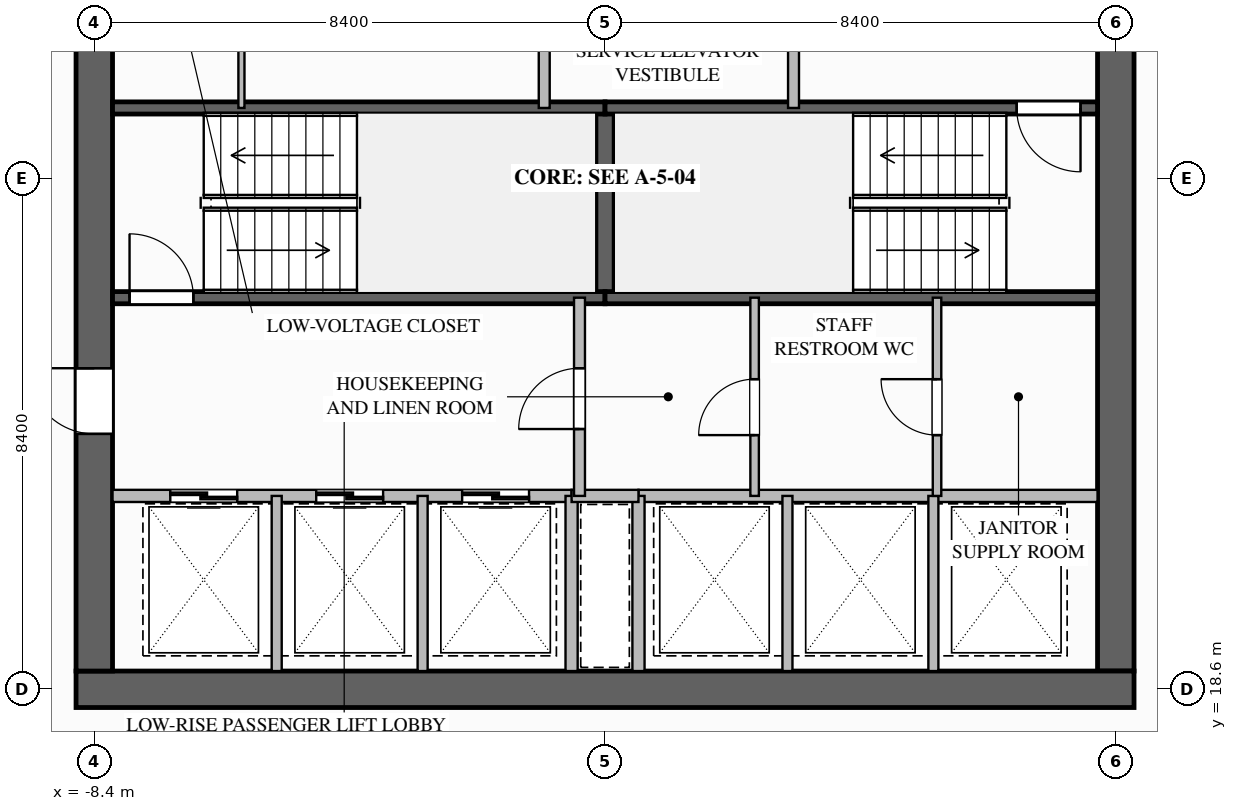
"""IFC4 building model, lengths in metres.
Left out: names, types, materials, properties, quantities, classifications, styles, units other than length and angle.
Written with IfcOpenShell. Run it as: python <this file> out.ifc"""

import sys

from ifc_helpers import new_model, si_unit, direction, frame, frame_2d, origin, place, context, subcontext, project, spatial, rectangle, extrude, element, fill, save


model = new_model("IFC4")
c1 = context("Model", 3, precision=1e-05, world=origin(), true_north=direction((0.0, 1.0)))
c2 = subcontext(c1, "Body", "Model", "MODEL_VIEW")
j1 = project(units=[si_unit("LENGTHUNIT", "METRE"), si_unit("PLANEANGLEUNIT", "RADIAN")], contexts=[c1])
p1 = place(None, origin())
s1 = spatial("IfcSite", under=j1, at=p1, CompositionType="ELEMENT")
p2 = place(p1, origin())
s2 = spatial("IfcBuilding", under=s1, at=p2, CompositionType="ELEMENT")
p3 = place(p2, frame((0.0, 0.0, 33.2)))
s3 = spatial("IfcBuildingStorey", under=s2, at=p3, CompositionType="ELEMENT", Elevation=33.2)
p4 = place(p3, frame((8.4, 35.1, 0.0), z_axis=(0.0, 0.0, 1.0), x_axis=(0.0, -1.0, 0.0)))
e1 = element("IfcWall", 1, at=p4, inside=s3, PredefinedType="SHEAR", context=c2, shape_type="SweptSolid", body=[
    extrude(rectangle(XDim=16.2, YDim=0.6, at=frame_2d((8.1, 0.0))), origin(), (0.0, 0.0, 1.0), 3.5),
])
p5 = place(p4, frame((3.08, 0.0, 0.0)))
e2 = element("IfcOpeningElement", 2, at=p5, cuts=e1, PredefinedType="OPENING", context=c2, shape_type="SweptSolid", body=[
    extrude(rectangle(XDim=1.12, YDim=2.1, at=frame_2d((0.56, 1.05))), frame((0.0, 0.31, 0.0), z_axis=(0.0, -1.0, 0.0), x_axis=(1.0, 0.0, 0.0)), (0.0, 0.0, 1.0), 0.62),
])
p6 = place(p3, frame((8.7, 18.6, 0.0), z_axis=(0.0, 0.0, 1.0), x_axis=(-1.0, 0.0, 0.0)))
e3 = element("IfcWall", 3, at=p6, inside=s3, PredefinedType="SHEAR", context=c2, shape_type="SweptSolid", body=[
    extrude(rectangle(XDim=17.4, YDim=0.6, at=frame_2d((8.7, 0.0))), origin(), (0.0, 0.0, 1.0), 3.5),
])
p7 = place(p3, frame((-8.4, 18.9, 0.0), z_axis=(0.0, 0.0, 1.0), x_axis=(0.0, 1.0, 0.0)))
e4 = element("IfcWall", 4, at=p7, inside=s3, PredefinedType="SHEAR", context=c2, shape_type="SweptSolid", body=[
    extrude(rectangle(XDim=16.2, YDim=0.6, at=frame_2d((8.1, 0.0))), origin(), (0.0, 0.0, 1.0), 3.5),
])
p8 = place(p7, frame((3.9, 0.0, 0.0)))
e5 = element("IfcOpeningElement", 5, at=p8, cuts=e4, PredefinedType="OPENING", context=c2, shape_type="SweptSolid", body=[
    extrude(rectangle(XDim=1.08, YDim=2.04, at=frame_2d((0.54, 1.02))), frame((0.0, 0.31, 0.0), z_axis=(0.0, -1.0, 0.0), x_axis=(1.0, 0.0, 0.0)), (0.0, 0.0, 1.0), 0.62),
])
p9 = place(p3, frame((0.0, 25.04, 0.0), z_axis=(0.0, 0.0, 1.0), x_axis=(0.0, 1.0, 0.0)))
e6 = element("IfcWall", 6, at=p9, inside=s3, PredefinedType="SOLIDWALL", context=c2, shape_type="SweptSolid", body=[
    extrude(rectangle(XDim=3.12, YDim=0.3, at=frame_2d((1.56, 0.0))), origin(), (0.0, 0.0, 1.0), 3.24),
])
p10 = place(p3, frame((-8.1, 25.04, 0.0), z_axis=(0.0, 0.0, 1.0), x_axis=(1.0, 0.0, 0.0)))
e7 = element("IfcWall", 7, at=p10, inside=s3, PredefinedType="SOLIDWALL", context=c2, shape_type="SweptSolid", body=[
    extrude(rectangle(XDim=8.1, YDim=0.2, at=frame_2d((4.05, 0.0))), origin(), (0.0, 0.0, 1.0), 3.24),
])
p11 = place(p10, frame((0.28, 0.0, 0.0)))
e8 = element("IfcOpeningElement", 8, at=p11, cuts=e7, PredefinedType="OPENING", context=c2, shape_type="SweptSolid", body=[
    extrude(rectangle(XDim=1.05, YDim=2.1, at=frame_2d((0.525, 1.05))), frame((0.0, 0.11, 0.0), z_axis=(0.0, -1.0, 0.0), x_axis=(1.0, 0.0, 0.0)), (0.0, 0.0, 1.0), 0.22),
])
for number, where, z_axis, x_axis in (
    (9, (-8.1, 28.16, 0.0), (0.0, 0.0, 1.0), (1.0, 0.0, 0.0)),
    (10, (0.0, 25.04, 0.0), (0.0, 0.0, 1.0), (1.0, 0.0, 0.0)),
):
    element("IfcWall", number, at=place(p3, frame(where, z_axis=z_axis, x_axis=x_axis)), inside=s3, PredefinedType="SOLIDWALL", context=c2, shape_type="SweptSolid", body=[
        extrude(rectangle(XDim=8.1, YDim=0.2, at=frame_2d((4.05, 0.0))), origin(), (0.0, 0.0, 1.0), 3.24),
    ])
p12 = place(p3, frame((8.1, 28.16, 0.0), z_axis=(0.0, 0.0, 1.0), x_axis=(-1.0, 0.0, 0.0)))
e11 = element("IfcWall", 11, at=p12, inside=s3, PredefinedType="SOLIDWALL", context=c2, shape_type="SweptSolid", body=[
    extrude(rectangle(XDim=8.1, YDim=0.2, at=frame_2d((4.05, 0.0))), origin(), (0.0, 0.0, 1.0), 3.24),
])
p13 = place(p12, frame((0.28, 0.0, 0.0)))
e12 = element("IfcOpeningElement", 12, at=p13, cuts=e11, PredefinedType="OPENING", context=c2, shape_type="SweptSolid", body=[
    extrude(rectangle(XDim=1.05, YDim=2.1, at=frame_2d((0.525, 1.05))), frame((0.0, 0.11, 0.0), z_axis=(0.0, -1.0, 0.0), x_axis=(1.0, 0.0, 0.0)), (0.0, 0.0, 1.0), 0.22),
])
p14 = place(p3, frame((3.1, 28.16, 0.0), z_axis=(0.0, 0.0, 1.0), x_axis=(0.0, 1.0, 0.0)))
e13 = element("IfcWall", 13, at=p14, inside=s3, PredefinedType="SOLIDWALL", context=c2, shape_type="SweptSolid", body=[
    extrude(rectangle(XDim=4.06, YDim=0.18, at=frame_2d((2.03, 0.0))), origin(), (0.0, 0.0, 1.0), 3.24),
])
p15 = place(p14, frame((1.4, 0.0, 0.0)))
e14 = element("IfcOpeningElement", 14, at=p15, cuts=e13, PredefinedType="OPENING", context=c2, shape_type="SweptSolid", body=[
    extrude(rectangle(XDim=1.12, YDim=2.1, at=frame_2d((0.56, 1.05))), frame((0.0, 0.1, 0.0), z_axis=(0.0, -1.0, 0.0), x_axis=(1.0, 0.0, 0.0)), (0.0, 0.0, 1.0), 0.2),
])
p16 = place(p3, frame((-1.0, 28.16, 0.0), z_axis=(0.0, 0.0, 1.0), x_axis=(0.0, 1.0, 0.0)))
e15 = element("IfcWall", 15, at=p16, inside=s3, PredefinedType="SOLIDWALL", context=c2, shape_type="SweptSolid", body=[
    extrude(rectangle(XDim=4.02, YDim=0.18, at=frame_2d((2.01, 0.0))), origin(), (0.0, 0.0, 1.0), 3.24),
])
p17 = place(p16, frame((1.4, 0.0, 0.0)))
e16 = element("IfcOpeningElement", 16, at=p17, cuts=e15, PredefinedType="OPENING", context=c2, shape_type="SweptSolid", body=[
    extrude(rectangle(XDim=1.0, YDim=2.1, at=frame_2d((0.5, 1.05))), frame((0.0, 0.1, 0.0), z_axis=(0.0, -1.0, 0.0), x_axis=(1.0, 0.0, 0.0)), (0.0, 0.0, 1.0), 0.2),
])
p18 = place(p3, frame((-5.98, 28.16, 0.0), z_axis=(0.0, 0.0, 1.0), x_axis=(0.0, 1.0, 0.0)))
e17 = element("IfcWall", 17, at=p18, inside=s3, PredefinedType="PARTITIONING", context=c2, shape_type="SweptSolid", body=[
    extrude(rectangle(XDim=4.06, YDim=0.1, at=frame_2d((2.03, 0.0))), origin(), (0.0, 0.0, 1.0), 3.24),
])
p19 = place(p18, frame((1.2, 0.0, 0.0)))
e18 = element("IfcOpeningElement", 18, at=p19, cuts=e17, PredefinedType="OPENING", context=c2, shape_type="SweptSolid", body=[
    extrude(rectangle(XDim=0.92, YDim=2.1, at=frame_2d((0.46, 1.05))), frame((0.0, 0.06, 0.0), z_axis=(0.0, -1.0, 0.0), x_axis=(1.0, 0.0, 0.0)), (0.0, 0.0, 1.0), 0.12),
])
p20 = place(p3, frame((-0.55, 21.78, 0.0), z_axis=(0.0, 0.0, 1.0), x_axis=(-1.0, 0.0, 0.0)))
e19 = element("IfcWall", 19, at=p20, inside=s3, PredefinedType="SOLIDWALL", context=c2, shape_type="SweptSolid", body=[
    extrude(rectangle(XDim=7.55, YDim=0.2, at=frame_2d((3.775, 0.0))), origin(), (0.0, 0.0, 1.0), 3.24),
])
p21 = place(p20, frame((5.5, 0.0, 0.0)))
e20 = element("IfcOpeningElement", 20, at=p21, cuts=e19, PredefinedType="OPENING", context=c2, shape_type="SweptSolid", body=[
    extrude(rectangle(XDim=1.1, YDim=2.2, at=frame_2d((0.55, 1.1))), frame((0.0, 0.11, 0.0), z_axis=(0.0, -1.0, 0.0), x_axis=(1.0, 0.0, 0.0)), (0.0, 0.0, 1.0), 0.22),
])
p22 = place(p20, frame((3.1, 0.0, 0.0)))
e21 = element("IfcOpeningElement", 21, at=p22, cuts=e19, PredefinedType="OPENING", context=c2, shape_type="SweptSolid", body=[
    extrude(rectangle(XDim=1.1, YDim=2.2, at=frame_2d((0.55, 1.1))), frame((0.0, 0.11, 0.0), z_axis=(0.0, -1.0, 0.0), x_axis=(1.0, 0.0, 0.0)), (0.0, 0.0, 1.0), 0.22),
])
p23 = place(p20, frame((0.7, 0.0, 0.0)))
e22 = element("IfcOpeningElement", 22, at=p23, cuts=e19, PredefinedType="OPENING", context=c2, shape_type="SweptSolid", body=[
    extrude(rectangle(XDim=1.1, YDim=2.2, at=frame_2d((0.55, 1.1))), frame((0.0, 0.11, 0.0), z_axis=(0.0, -1.0, 0.0), x_axis=(1.0, 0.0, 0.0)), (0.0, 0.0, 1.0), 0.22),
])
for number, where, z_axis, x_axis in (
    (23, (-5.4, 18.9, 0.0), (0.0, 0.0, 1.0), (0.0, 1.0, 0.0)),
    (24, (-3.0, 18.9, 0.0), (0.0, 0.0, 1.0), (0.0, 1.0, 0.0)),
):
    element("IfcWall", number, at=place(p3, frame(where, z_axis=z_axis, x_axis=x_axis)), inside=s3, PredefinedType="PARTITIONING", context=c2, shape_type="SweptSolid", body=[
        extrude(rectangle(XDim=2.88, YDim=0.165, at=frame_2d((1.44, 0.0))), origin(), (0.0, 0.0, 1.0), 3.24),
    ])
p24 = place(p3, frame((-0.55, 18.9, 0.0), z_axis=(0.0, 0.0, 1.0), x_axis=(0.0, 1.0, 0.0)))
e25 = element("IfcWall", 25, at=p24, inside=s3, PredefinedType="SOLIDWALL", context=c2, shape_type="SweptSolid", body=[
    extrude(rectangle(XDim=2.88, YDim=0.2, at=frame_2d((1.44, 0.0))), origin(), (0.0, 0.0, 1.0), 3.24),
])
p25 = place(p3, frame((8.1, 21.78, 0.0), z_axis=(0.0, 0.0, 1.0), x_axis=(-1.0, 0.0, 0.0)))
e26 = element("IfcWall", 26, at=p25, inside=s3, PredefinedType="SOLIDWALL", context=c2, shape_type="SweptSolid", body=[
    extrude(rectangle(XDim=7.55, YDim=0.2, at=frame_2d((3.775, 0.0))), origin(), (0.0, 0.0, 1.0), 3.24),
])
p26 = place(p3, frame((0.55, 18.9, 0.0), z_axis=(0.0, 0.0, 1.0), x_axis=(0.0, 1.0, 0.0)))
e27 = element("IfcWall", 27, at=p26, inside=s3, PredefinedType="SOLIDWALL", context=c2, shape_type="SweptSolid", body=[
    extrude(rectangle(XDim=2.88, YDim=0.2, at=frame_2d((1.44, 0.0))), origin(), (0.0, 0.0, 1.0), 3.24),
])
for number, where, z_axis, x_axis in (
    (28, (3.0, 18.9, 0.0), (0.0, 0.0, 1.0), (0.0, 1.0, 0.0)),
    (29, (5.4, 18.9, 0.0), (0.0, 0.0, 1.0), (0.0, 1.0, 0.0)),
):
    element("IfcWall", number, at=place(p3, frame(where, z_axis=z_axis, x_axis=x_axis)), inside=s3, PredefinedType="PARTITIONING", context=c2, shape_type="SweptSolid", body=[
        extrude(rectangle(XDim=2.88, YDim=0.165, at=frame_2d((1.44, 0.0))), origin(), (0.0, 0.0, 1.0), 3.24),
    ])
p27 = place(p3, frame((-0.55, 21.78, 0.0), z_axis=(0.0, 0.0, 1.0), x_axis=(1.0, 0.0, 0.0)))
e30 = element("IfcWall", 30, at=p27, inside=s3, PredefinedType="SOLIDWALL", context=c2, shape_type="SweptSolid", body=[
    extrude(rectangle(XDim=1.1, YDim=0.2, at=frame_2d((0.55, 0.0))), origin(), (0.0, 0.0, 1.0), 3.24),
])
p28 = place(p3, frame((-0.42, 21.78, 0.0), z_axis=(0.0, 0.0, 1.0), x_axis=(0.0, 1.0, 0.0)))
e31 = element("IfcWall", 31, at=p28, inside=s3, PredefinedType="SOLIDWALL", context=c2, shape_type="SweptSolid", body=[
    extrude(rectangle(XDim=3.26, YDim=0.18, at=frame_2d((1.63, 0.0))), origin(), (0.0, 0.0, 1.0), 3.24),
])
p29 = place(p28, frame((1.1, 0.0, 0.0)))
e32 = element("IfcOpeningElement", 32, at=p29, cuts=e31, PredefinedType="OPENING", context=c2, shape_type="SweptSolid", body=[
    extrude(rectangle(XDim=1.0, YDim=2.1, at=frame_2d((0.5, 1.05))), frame((0.0, 0.1, 0.0), z_axis=(0.0, -1.0, 0.0), x_axis=(1.0, 0.0, 0.0)), (0.0, 0.0, 1.0), 0.2),
])
p30 = place(p3, frame((2.46, 21.78, 0.0), z_axis=(0.0, 0.0, 1.0), x_axis=(0.0, 1.0, 0.0)))
e33 = element("IfcWall", 33, at=p30, inside=s3, PredefinedType="PLUMBINGWALL", context=c2, shape_type="SweptSolid", body=[
    extrude(rectangle(XDim=3.26, YDim=0.14, at=frame_2d((1.63, 0.0))), origin(), (0.0, 0.0, 1.0), 3.24),
])
p31 = place(p30, frame((1.0, 0.0, 0.0)))
e34 = element("IfcOpeningElement", 34, at=p31, cuts=e33, PredefinedType="OPENING", context=c2, shape_type="SweptSolid", body=[
    extrude(rectangle(XDim=0.92, YDim=2.1, at=frame_2d((0.46, 1.05))), frame((0.0, 0.08, 0.0), z_axis=(0.0, -1.0, 0.0), x_axis=(1.0, 0.0, 0.0)), (0.0, 0.0, 1.0), 0.16),
])
p32 = place(p3, frame((5.46, 21.78, 0.0), z_axis=(0.0, 0.0, 1.0), x_axis=(0.0, 1.0, 0.0)))
e35 = element("IfcWall", 35, at=p32, inside=s3, PredefinedType="PLUMBINGWALL", context=c2, shape_type="SweptSolid", body=[
    extrude(rectangle(XDim=3.26, YDim=0.14, at=frame_2d((1.63, 0.0))), origin(), (0.0, 0.0, 1.0), 3.24),
])
p33 = place(p32, frame((1.0, 0.0, 0.0)))
e36 = element("IfcOpeningElement", 36, at=p33, cuts=e35, PredefinedType="OPENING", context=c2, shape_type="SweptSolid", body=[
    extrude(rectangle(XDim=0.92, YDim=2.1, at=frame_2d((0.46, 1.05))), frame((0.0, 0.08, 0.0), z_axis=(0.0, -1.0, 0.0), x_axis=(1.0, 0.0, 0.0)), (0.0, 0.0, 1.0), 0.16),
])
p34 = place(p11, origin())
e37 = element("IfcDoor", 37, at=p34, inside=s3, OperationType="SINGLE_SWING_LEFT", PredefinedType="DOOR", context=c2, shape_type="SweptSolid", body=[
    extrude(rectangle(XDim=1.05, YDim=2.1, at=frame_2d((0.525, 1.05))), frame((0.0, 0.025, 0.0), z_axis=(0.0, -1.0, 0.0), x_axis=(1.0, 0.0, 0.0)), (0.0, 0.0, 1.0), 0.05),
])
fill(e8, e37)
p35 = place(p13, origin())
e38 = element("IfcDoor", 38, at=p35, inside=s3, OperationType="SINGLE_SWING_LEFT", PredefinedType="DOOR", context=c2, shape_type="SweptSolid", body=[
    extrude(rectangle(XDim=1.05, YDim=2.1, at=frame_2d((0.525, 1.05))), frame((0.0, 0.025, 0.0), z_axis=(0.0, -1.0, 0.0), x_axis=(1.0, 0.0, 0.0)), (0.0, 0.0, 1.0), 0.05),
])
fill(e12, e38)
p36 = place(p21, origin())
e39 = element("IfcDoor", 39, at=p36, inside=s3, OperationType="SLIDING_TO_LEFT", PredefinedType="DOOR", context=c2, shape_type="SweptSolid", body=[
    extrude(rectangle(XDim=1.1, YDim=2.2, at=frame_2d((0.55, 1.1))), frame((0.0, 0.025, 0.0), z_axis=(0.0, -1.0, 0.0), x_axis=(1.0, 0.0, 0.0)), (0.0, 0.0, 1.0), 0.05),
])
fill(e20, e39)
p37 = place(p22, origin())
e40 = element("IfcDoor", 40, at=p37, inside=s3, OperationType="SLIDING_TO_LEFT", PredefinedType="DOOR", context=c2, shape_type="SweptSolid", body=[
    extrude(rectangle(XDim=1.1, YDim=2.2, at=frame_2d((0.55, 1.1))), frame((0.0, 0.025, 0.0), z_axis=(0.0, -1.0, 0.0), x_axis=(1.0, 0.0, 0.0)), (0.0, 0.0, 1.0), 0.05),
])
fill(e21, e40)
p38 = place(p23, origin())
e41 = element("IfcDoor", 41, at=p38, inside=s3, OperationType="SLIDING_TO_LEFT", PredefinedType="DOOR", context=c2, shape_type="SweptSolid", body=[
    extrude(rectangle(XDim=1.1, YDim=2.2, at=frame_2d((0.55, 1.1))), frame((0.0, 0.025, 0.0), z_axis=(0.0, -1.0, 0.0), x_axis=(1.0, 0.0, 0.0)), (0.0, 0.0, 1.0), 0.05),
])
fill(e22, e41)
p39 = place(p29, origin())
e42 = element("IfcDoor", 42, at=p39, inside=s3, OperationType="SINGLE_SWING_LEFT", PredefinedType="DOOR", context=c2, shape_type="SweptSolid", body=[
    extrude(rectangle(XDim=1.0, YDim=2.1, at=frame_2d((0.5, 1.05))), frame((0.0, 0.025, 0.0), z_axis=(0.0, -1.0, 0.0), x_axis=(1.0, 0.0, 0.0)), (0.0, 0.0, 1.0), 0.05),
])
fill(e32, e42)
p40 = place(p8, origin())
e43 = element("IfcDoor", 43, at=p40, inside=s3, OperationType="SINGLE_SWING_RIGHT", PredefinedType="DOOR", context=c2, shape_type="SweptSolid", body=[
    extrude(rectangle(XDim=1.08, YDim=2.04, at=frame_2d((0.54, 1.02))), frame((0.0, 0.025, 0.0), z_axis=(0.0, -1.0, 0.0), x_axis=(1.0, 0.0, 0.0)), (0.0, 0.0, 1.0), 0.05),
])
fill(e5, e43)
p41 = place(p31, origin())
e44 = element("IfcDoor", 44, at=p41, inside=s3, OperationType="SINGLE_SWING_LEFT", PredefinedType="DOOR", context=c2, shape_type="SweptSolid", body=[
    extrude(rectangle(XDim=0.92, YDim=2.1, at=frame_2d((0.46, 1.05))), frame((0.0, 0.025, 0.0), z_axis=(0.0, -1.0, 0.0), x_axis=(1.0, 0.0, 0.0)), (0.0, 0.0, 1.0), 0.05),
])
fill(e34, e44)
p42 = place(p33, origin())
e45 = element("IfcDoor", 45, at=p42, inside=s3, OperationType="SINGLE_SWING_RIGHT", PredefinedType="DOOR", context=c2, shape_type="SweptSolid", body=[
    extrude(rectangle(XDim=0.92, YDim=2.1, at=frame_2d((0.46, 1.05))), frame((0.0, 0.025, 0.0), z_axis=(0.0, -1.0, 0.0), x_axis=(1.0, 0.0, 0.0)), (0.0, 0.0, 1.0), 0.05),
])
fill(e36, e45)
save(model, sys.argv[1])
